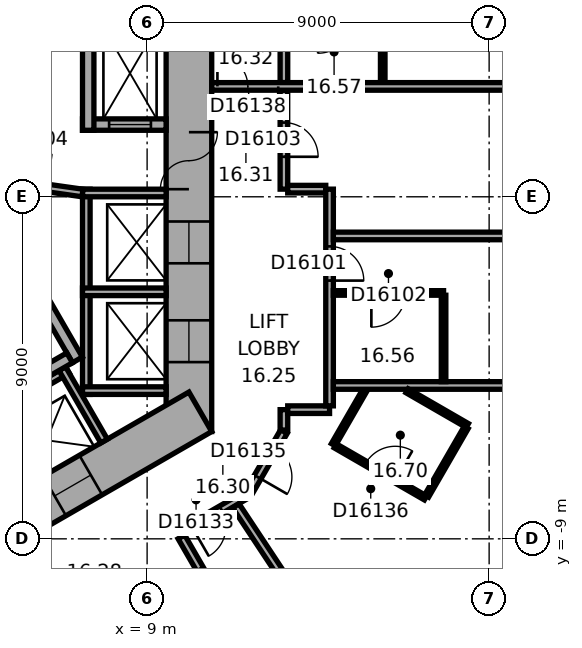
"""IFC4 building model, lengths in metres.
Left out: names, types, materials, properties, quantities, classifications, styles, units other than length and angle.
Written with IfcOpenShell. Run it as: python <this file> out.ifc"""

import sys

from ifc_helpers import new_model, si_unit, direction, frame, frame_2d, origin, place, context, subcontext, project, spatial, rectangle, extrude, element, fill, save


model = new_model("IFC4")
c1 = context("Model", 3, precision=1e-05, world=origin(), true_north=direction((0.0, 1.0)))
c2 = subcontext(c1, "Body", "Model", "MODEL_VIEW")
j1 = project(units=[si_unit("LENGTHUNIT", "METRE"), si_unit("PLANEANGLEUNIT", "RADIAN")], contexts=[c1])
p1 = place(None, origin())
s1 = spatial("IfcSite", under=j1, at=p1, CompositionType="ELEMENT")
p2 = place(p1, origin())
s2 = spatial("IfcBuilding", under=s1, at=p2, CompositionType="ELEMENT")
p3 = place(p2, frame((0.0, 0.0, 73.7)))
s3 = spatial("IfcBuildingStorey", under=s2, at=p3, CompositionType="ELEMENT", Elevation=73.7)
p4 = place(p3, frame((10.1, -6.177, 0.0), z_axis=(0.0, 0.0, 1.0), x_axis=(0.0, 1.0, 0.0)))
e1 = element("IfcWall", 1, at=p4, inside=s3, PredefinedType="SHEAR", context=c2, shape_type="SweptSolid", body=[
    extrude(rectangle(XDim=12.355, YDim=1.2, at=frame_2d((6.177, 0.0))), origin(), (0.0, 0.0, 1.0), 3.3),
])
p5 = place(p4, frame((6.378, 0.0, 0.0)))
e2 = element("IfcOpeningElement", 2, at=p5, cuts=e1, PredefinedType="OPENING", context=c2, shape_type="SweptSolid", body=[
    extrude(rectangle(XDim=1.5, YDim=2.1, at=frame_2d((0.75, 1.05))), frame((0.0, 0.61, 0.0), z_axis=(0.0, -1.0, 0.0), x_axis=(1.0, 0.0, 0.0)), (0.0, 0.0, 1.0), 1.22),
])
p6 = place(p4, frame((1.828, 0.0, 0.0)))
e3 = element("IfcOpeningElement", 3, at=p6, cuts=e1, PredefinedType="OPENING", context=c2, shape_type="SweptSolid", body=[
    extrude(rectangle(XDim=1.1, YDim=2.1, at=frame_2d((0.55, 1.05))), frame((0.0, 0.61, 0.0), z_axis=(0.0, -1.0, 0.0), x_axis=(1.0, 0.0, 0.0)), (0.0, 0.0, 1.0), 1.22),
])
p7 = place(p4, frame((4.427, 0.0, 0.0)))
e4 = element("IfcOpeningElement", 4, at=p7, cuts=e1, PredefinedType="OPENING", context=c2, shape_type="SweptSolid", body=[
    extrude(rectangle(XDim=1.1, YDim=2.1, at=frame_2d((0.55, 1.05))), frame((0.0, 0.61, 0.0), z_axis=(0.0, -1.0, 0.0), x_axis=(1.0, 0.0, 0.0)), (0.0, 0.0, 1.0), 1.22),
])
p8 = place(p3, frame((-0.3, -11.836, 0.0), z_axis=(0.0, 0.0, 1.0), x_axis=(0.866021384402, 0.500006961711, 0.0)))
e5 = element("IfcWall", 5, at=p8, inside=s3, PredefinedType="SHEAR", context=c2, shape_type="SweptSolid", body=[
    extrude(rectangle(XDim=12.355, YDim=1.2, at=frame_2d((6.178, 0.0))), origin(), (0.0, 0.0, 1.0), 3.3),
])
p9 = place(p8, frame((2.828, 0.0, 0.0)))
e6 = element("IfcOpeningElement", 6, at=p9, cuts=e5, PredefinedType="OPENING", context=c2, shape_type="SweptSolid", body=[
    extrude(rectangle(XDim=0.9, YDim=2.1, at=frame_2d((0.45, 1.05))), frame((0.0, 0.61, 0.0), z_axis=(0.0, -1.0, 0.0), x_axis=(1.0, 0.0, 0.0)), (0.0, 0.0, 1.0), 1.22),
])
p10 = place(p8, frame((5.428, 0.0, 0.0)))
e7 = element("IfcOpeningElement", 7, at=p10, cuts=e5, PredefinedType="OPENING", context=c2, shape_type="SweptSolid", body=[
    extrude(rectangle(XDim=0.9, YDim=2.1, at=frame_2d((0.45, 1.05))), frame((0.0, 0.61, 0.0), z_axis=(0.0, -1.0, 0.0), x_axis=(1.0, 0.0, 0.0)), (0.0, 0.0, 1.0), 1.22),
])
p11 = place(p8, frame((7.928, 0.0, 0.0)))
e8 = element("IfcOpeningElement", 8, at=p11, cuts=e5, PredefinedType="OPENING", context=c2, shape_type="SweptSolid", body=[
    extrude(rectangle(XDim=1.1, YDim=2.1, at=frame_2d((0.55, 1.05))), frame((0.0, 0.61, 0.0), z_axis=(0.0, -1.0, 0.0), x_axis=(1.0, 0.0, 0.0)), (0.0, 0.0, 1.0), 1.22),
])
p12 = place(p3, frame((7.4, -5.2, 0.0), z_axis=(0.0, 0.0, 1.0), x_axis=(0.0, 1.0, 0.0)))
e9 = element("IfcWall", 9, at=p12, inside=s3, PredefinedType="PARTITIONING", context=c2, shape_type="SweptSolid", body=[
    extrude(rectangle(XDim=5.4, YDim=0.2, at=frame_2d((2.7, 0.0))), origin(), (0.0, 0.0, 1.0), 2.95),
])
for number, where, z_axis, x_axis in (
    (10, (7.3, -5.1, 0.0), (0.0, 0.0, 1.0), (1.0, 0.0, 0.0)),
    (11, (7.3, -2.5, 0.0), (0.0, 0.0, 1.0), (1.0, 0.0, 0.0)),
    (12, (7.3, 0.1, 0.0), (0.0, 0.0, 1.0), (1.0, 0.0, 0.0)),
):
    element("IfcWall", number, at=place(p3, frame(where, z_axis=z_axis, x_axis=x_axis)), inside=s3, PredefinedType="PARTITIONING", context=c2, shape_type="SweptSolid", body=[
        extrude(rectangle(XDim=2.2, YDim=0.2, at=frame_2d((1.1, 0.0))), origin(), (0.0, 0.0, 1.0), 2.95),
    ])
p13 = place(p3, frame((-0.024, -8.559, 0.0), z_axis=(0.0, 0.0, 1.0), x_axis=(0.866026010844, 0.49999894854, 0.0)))
e13 = element("IfcWall", 13, at=p13, inside=s3, PredefinedType="PARTITIONING", context=c2, shape_type="SweptSolid", body=[
    extrude(rectangle(XDim=8.0, YDim=0.2, at=frame_2d((4.0, 0.0))), origin(), (0.0, 0.0, 1.0), 2.95),
])
p14 = place(p3, frame((6.768, -4.522, 0.0), z_axis=(0.0, 0.0, 1.0), x_axis=(0.50002983664, -0.866008176907, 0.0)))
e14 = element("IfcWall", 14, at=p14, inside=s3, PredefinedType="PARTITIONING", context=c2, shape_type="SweptSolid", body=[
    extrude(rectangle(XDim=2.2, YDim=0.2, at=frame_2d((1.1, 0.0))), origin(), (0.0, 0.0, 1.0), 2.95),
])
p15 = place(p3, frame((4.158, 0.602, 0.0), z_axis=(0.0, 0.0, 1.0), x_axis=(0.499977259774, 0.866038532462, 0.0)))
e15 = element("IfcWall", 15, at=p15, inside=s3, PredefinedType="SHEAR", context=c2, shape_type="SweptSolid", body=[
    extrude(rectangle(XDim=4.7, YDim=0.3, at=frame_2d((2.35, 0.0))), origin(), (0.0, 0.0, 1.0), 2.95),
])
p16 = place(p15, frame((0.8, 0.0, 0.0)))
e16 = element("IfcOpeningElement", 16, at=p16, cuts=e15, PredefinedType="OPENING", context=c2, shape_type="SweptSolid", body=[
    extrude(rectangle(XDim=1.2, YDim=2.1, at=frame_2d((0.6, 1.05))), frame((0.0, 0.16, 0.0), z_axis=(0.0, -1.0, 0.0), x_axis=(1.0, 0.0, 0.0)), (0.0, 0.0, 1.0), 0.32),
])
p17 = place(p3, frame((4.816, -0.222, 0.0), z_axis=(0.0, 0.0, 1.0), x_axis=(0.499977259774, -0.866038532462, 0.0)))
e17 = element("IfcWall", 17, at=p17, inside=s3, PredefinedType="SHEAR", context=c2, shape_type="SweptSolid", body=[
    extrude(rectangle(XDim=4.7, YDim=0.3, at=frame_2d((2.35, 0.0))), origin(), (0.0, 0.0, 1.0), 2.95),
])
p18 = place(p3, frame((0.847, -7.767, 0.0), z_axis=(0.0, 0.0, 1.0), x_axis=(0.866027801685, 0.499995846692, 0.0)))
e18 = element("IfcWall", 18, at=p18, inside=s3, PredefinedType="SHEAR", context=c2, shape_type="SweptSolid", body=[
    extrude(rectangle(XDim=7.06, YDim=0.3, at=frame_2d((3.53, 0.0))), origin(), (0.0, 0.0, 1.0), 2.95),
])
p19 = place(p3, frame((7.3, 1.9, 0.0), z_axis=(0.0, 0.0, 1.0), x_axis=(1.0, 0.0, 0.0)))
e19 = element("IfcWall", 19, at=p19, inside=s3, PredefinedType="SHEAR", context=c2, shape_type="SweptSolid", body=[
    extrude(rectangle(XDim=2.2, YDim=0.3, at=frame_2d((1.1, 0.0))), origin(), (0.0, 0.0, 1.0), 2.95),
])
p20 = place(p19, frame((0.7, 0.0, 0.0)))
e20 = element("IfcOpeningElement", 20, at=p20, cuts=e19, PredefinedType="OPENING", context=c2, shape_type="SweptSolid", body=[
    extrude(rectangle(XDim=1.1, YDim=2.1, at=frame_2d((0.55, 1.05))), frame((0.0, 0.16, 0.0), z_axis=(0.0, -1.0, 0.0), x_axis=(1.0, 0.0, 0.0)), (0.0, 0.0, 1.0), 0.32),
])
p21 = place(p3, frame((7.45, 1.75, 0.0), z_axis=(0.0, 0.0, 1.0), x_axis=(0.0, 1.0, 0.0)))
e21 = element("IfcWall", 21, at=p21, inside=s3, PredefinedType="SHEAR", context=c2, shape_type="SweptSolid", body=[
    extrude(rectangle(XDim=3.35, YDim=0.3, at=frame_2d((1.675, 0.0))), origin(), (0.0, 0.0, 1.0), 2.95),
])
p22 = place(p3, frame((4.327, 0.521, 0.0), z_axis=(0.0, 0.0, 1.0), x_axis=(0.990124376366, -0.14019172346, 0.0)))
e22 = element("IfcWall", 22, at=p22, inside=s3, PredefinedType="PARTITIONING", context=c2, shape_type="SweptSolid", body=[
    extrude(rectangle(XDim=3.002, YDim=0.2, at=frame_2d((1.501, 0.0))), origin(), (0.0, 0.0, 1.0), 2.95),
])
p23 = place(p22, frame((1.15, 0.0, 0.0)))
e23 = element("IfcOpeningElement", 23, at=p23, cuts=e22, PredefinedType="OPENING", context=c2, shape_type="SweptSolid", body=[
    extrude(rectangle(XDim=0.9, YDim=2.1, at=frame_2d((0.45, 1.05))), frame((0.0, 0.11, 0.0), z_axis=(0.0, -1.0, 0.0), x_axis=(1.0, 0.0, 0.0)), (0.0, 0.0, 1.0), 0.22),
])
p24 = place(p3, frame((9.852, -8.861, 0.0), z_axis=(0.0, 0.0, 1.0), x_axis=(0.866013291437, 0.500020978615, 0.0)))
e24 = element("IfcWall", 24, at=p24, inside=s3, PredefinedType="PARTITIONING", context=c2, shape_type="SweptSolid", body=[
    extrude(rectangle(XDim=2.077, YDim=0.2, at=frame_2d((1.038, 0.0))), origin(), (0.0, 0.0, 1.0), 2.95),
])
p25 = place(p24, frame((0.372, 0.0, 0.0)))
e25 = element("IfcOpeningElement", 25, at=p25, cuts=e24, PredefinedType="OPENING", context=c2, shape_type="SweptSolid", body=[
    extrude(rectangle(XDim=0.9, YDim=2.1, at=frame_2d((0.45, 1.05))), frame((0.0, 0.11, 0.0), z_axis=(0.0, -1.0, 0.0), x_axis=(1.0, 0.0, 0.0)), (0.0, 0.0, 1.0), 0.22),
])
p26 = place(p3, frame((10.402, -9.815, 0.0), z_axis=(0.0, 0.0, 1.0), x_axis=(-0.499968756647, 0.866043441391, 0.0)))
e26 = element("IfcWall", 26, at=p26, inside=s3, PredefinedType="PARTITIONING", context=c2, shape_type="SweptSolid", body=[
    extrude(rectangle(XDim=1.001, YDim=0.2, at=frame_2d((0.5, 0.0))), origin(), (0.0, 0.0, 1.0), 2.95),
])
p27 = place(p3, frame((11.67, -7.788, 0.0), z_axis=(0.0, 0.0, 1.0), x_axis=(0.500063286585, 0.865988862174, 0.0)))
e27 = element("IfcWall", 27, at=p27, inside=s3, PredefinedType="PARTITIONING", context=c2, shape_type="SweptSolid", body=[
    extrude(rectangle(XDim=1.86, YDim=0.2, at=frame_2d((0.93, 0.0))), origin(), (0.0, 0.0, 1.0), 2.95),
])
p28 = place(p27, frame((0.48, 0.0, 0.0)))
e28 = element("IfcOpeningElement", 28, at=p28, cuts=e27, PredefinedType="OPENING", context=c2, shape_type="SweptSolid", body=[
    extrude(rectangle(XDim=0.9, YDim=2.1, at=frame_2d((0.45, 1.05))), frame((0.0, 0.11, 0.0), z_axis=(0.0, -1.0, 0.0), x_axis=(1.0, 0.0, 0.0)), (0.0, 0.0, 1.0), 0.22),
])
p29 = place(p3, frame((12.6, -6.138, 0.0), z_axis=(0.0, 0.0, 1.0), x_axis=(0.0, 1.0, 0.0)))
e29 = element("IfcWall", 29, at=p29, inside=s3, PredefinedType="PARTITIONING", context=c2, shape_type="SweptSolid", body=[
    extrude(rectangle(XDim=0.537, YDim=0.2, at=frame_2d((0.268, 0.0))), origin(), (0.0, 0.0, 1.0), 2.95),
])
p30 = place(p3, frame((12.6, 0.201, 0.0), z_axis=(0.0, 0.0, 1.0), x_axis=(0.0, 1.0, 0.0)))
e30 = element("IfcWall", 30, at=p30, inside=s3, PredefinedType="PARTITIONING", context=c2, shape_type="SweptSolid", body=[
    extrude(rectangle(XDim=2.604, YDim=0.2, at=frame_2d((1.302, 0.0))), origin(), (0.0, 0.0, 1.0), 2.95),
])
p31 = place(p30, frame((0.852, 0.0, 0.0)))
e31 = element("IfcOpeningElement", 31, at=p31, cuts=e30, PredefinedType="OPENING", context=c2, shape_type="SweptSolid", body=[
    extrude(rectangle(XDim=0.9, YDim=2.1, at=frame_2d((0.45, 1.05))), frame((0.0, 0.11, 0.0), z_axis=(0.0, -1.0, 0.0), x_axis=(1.0, 0.0, 0.0)), (0.0, 0.0, 1.0), 0.22),
])
p32 = place(p3, frame((12.6, 3.004, 0.0), z_axis=(0.0, 0.0, 1.0), x_axis=(0.0, 1.0, 0.0)))
e32 = element("IfcWall", 32, at=p32, inside=s3, PredefinedType="PARTITIONING", context=c2, shape_type="SweptSolid", body=[
    extrude(rectangle(XDim=3.173, YDim=0.2, at=frame_2d((1.586, 0.0))), origin(), (0.0, 0.0, 1.0), 2.95),
])
p33 = place(p32, frame((1.998, 0.0, 0.0)))
e33 = element("IfcOpeningElement", 33, at=p33, cuts=e32, PredefinedType="OPENING", context=c2, shape_type="SweptSolid", body=[
    extrude(rectangle(XDim=0.9, YDim=2.1, at=frame_2d((0.45, 1.05))), frame((0.0, 0.11, 0.0), z_axis=(0.0, -1.0, 0.0), x_axis=(1.0, 0.0, 0.0)), (0.0, 0.0, 1.0), 0.22),
])
p34 = place(p3, frame((12.7, -5.601, 0.0), z_axis=(0.0, 0.0, 1.0), x_axis=(1.0, 0.0, 0.0)))
e34 = element("IfcWall", 34, at=p34, inside=s3, PredefinedType="PARTITIONING", context=c2, shape_type="SweptSolid", body=[
    extrude(rectangle(XDim=1.101, YDim=0.2, at=frame_2d((0.551, 0.0))), origin(), (0.0, 0.0, 1.0), 2.95),
])
p35 = place(p3, frame((13.701, 0.201, 0.0), z_axis=(0.0, 0.0, 1.0), x_axis=(-1.0, 0.0, 0.0)))
e35 = element("IfcWall", 35, at=p35, inside=s3, PredefinedType="PARTITIONING", context=c2, shape_type="SweptSolid", body=[
    extrude(rectangle(XDim=1.001, YDim=0.2, at=frame_2d((0.5, 0.0))), origin(), (0.0, 0.0, 1.0), 2.95),
])
p36 = place(p3, frame((13.801, -5.501, 0.0), z_axis=(0.0, 0.0, 1.0), x_axis=(0.0, 1.0, 0.0)))
e36 = element("IfcWall", 36, at=p36, inside=s3, PredefinedType="PARTITIONING", context=c2, shape_type="SweptSolid", body=[
    extrude(rectangle(XDim=5.702, YDim=0.2, at=frame_2d((2.851, 0.0))), origin(), (0.0, 0.0, 1.0), 2.95),
])
p37 = place(p36, frame((3.296, 0.0, 0.0)))
e37 = element("IfcOpeningElement", 37, at=p37, cuts=e36, PredefinedType="OPENING", context=c2, shape_type="SweptSolid", body=[
    extrude(rectangle(XDim=0.9, YDim=2.1, at=frame_2d((0.45, 1.05))), frame((0.0, 0.11, 0.0), z_axis=(0.0, -1.0, 0.0), x_axis=(1.0, 0.0, 0.0)), (0.0, 0.0, 1.0), 0.22),
])
p38 = place(p3, frame((13.901, -6.524, 0.0), z_axis=(0.0, 0.0, 1.0), x_axis=(0.499964162598, 0.86604609353, 0.0)))
e38 = element("IfcWall", 38, at=p38, inside=s3, PredefinedType="PARTITIONING", context=c2, shape_type="SweptSolid", body=[
    extrude(rectangle(XDim=1.661, YDim=0.12, at=frame_2d((0.831, 0.0))), origin(), (0.0, 0.0, 1.0), 2.95),
])
p39 = place(p3, frame((13.901, -4.965, 0.0), z_axis=(0.0, 0.0, 1.0), x_axis=(1.0, 0.0, 0.0)))
e39 = element("IfcWall", 39, at=p39, inside=s3, PredefinedType="PARTITIONING", context=c2, shape_type="SweptSolid", body=[
    extrude(rectangle(XDim=8.049, YDim=0.2, at=frame_2d((4.024, 0.0))), origin(), (0.0, 0.0, 1.0), 2.95),
])
p40 = place(p3, frame((13.901, -2.53, 0.0), z_axis=(0.0, 0.0, 1.0), x_axis=(1.0, 0.0, 0.0)))
e40 = element("IfcWall", 40, at=p40, inside=s3, PredefinedType="PARTITIONING", context=c2, shape_type="SweptSolid", body=[
    extrude(rectangle(XDim=2.9, YDim=0.12, at=frame_2d((1.45, 0.0))), origin(), (0.0, 0.0, 1.0), 2.95),
])
p41 = place(p40, frame((1.0, 0.0, 0.0)))
e41 = element("IfcOpeningElement", 41, at=p41, cuts=e40, PredefinedType="OPENING", context=c2, shape_type="SweptSolid", body=[
    extrude(rectangle(XDim=0.9, YDim=2.1, at=frame_2d((0.45, 1.05))), frame((0.0, 0.07, 0.0), z_axis=(0.0, -1.0, 0.0), x_axis=(1.0, 0.0, 0.0)), (0.0, 0.0, 1.0), 0.14),
])
p42 = place(p3, frame((15.2, 4.618, 0.0), z_axis=(0.0, 0.0, 1.0), x_axis=(0.0, -1.0, 0.0)))
e42 = element("IfcWall", 42, at=p42, inside=s3, PredefinedType="PARTITIONING", context=c2, shape_type="SweptSolid", body=[
    extrude(rectangle(XDim=1.613, YDim=0.12, at=frame_2d((0.807, 0.0))), origin(), (0.0, 0.0, 1.0), 2.95),
])
p43 = place(p3, frame((15.841, -5.104, 0.0), z_axis=(0.0, 0.0, 1.0), x_axis=(0.866025591402, -0.499999675036, 0.0)))
e43 = element("IfcWall", 43, at=p43, inside=s3, PredefinedType="PARTITIONING", context=c2, shape_type="SweptSolid", body=[
    extrude(rectangle(XDim=1.83, YDim=0.12, at=frame_2d((0.915, 0.0))), origin(), (0.0, 0.0, 1.0), 2.95),
])
p44 = place(p3, frame((16.255, -15.564, 0.0), z_axis=(0.0, 0.0, 1.0), x_axis=(-0.55192208744, 0.833895682562, 0.0)))
e44 = element("IfcWall", 44, at=p44, inside=s3, PredefinedType="PARTITIONING", context=c2, shape_type="SweptSolid", body=[
    extrude(rectangle(XDim=8.913, YDim=0.2, at=frame_2d((4.457, 0.0))), origin(), (0.0, 0.0, 1.0), 2.15),
])
p45 = place(p3, frame((16.326, -7.925, 0.0), z_axis=(0.0, 0.0, 1.0), x_axis=(-0.865997131366, 0.500048966069, 0.0)))
e45 = element("IfcWall", 45, at=p45, inside=s3, PredefinedType="PARTITIONING", context=c2, shape_type="SweptSolid", body=[
    extrude(rectangle(XDim=2.74, YDim=0.12, at=frame_2d((1.37, 0.0))), origin(), (0.0, 0.0, 1.0), 2.95),
])
p46 = place(p45, frame((0.92, 0.0, 0.0)))
e46 = element("IfcOpeningElement", 46, at=p46, cuts=e45, PredefinedType="OPENING", context=c2, shape_type="SweptSolid", body=[
    extrude(rectangle(XDim=0.9, YDim=2.1, at=frame_2d((0.45, 1.05))), frame((0.0, 0.07, 0.0), z_axis=(0.0, -1.0, 0.0), x_axis=(1.0, 0.0, 0.0)), (0.0, 0.0, 1.0), 0.14),
])
p47 = place(p3, frame((16.801, -2.59, 0.0), z_axis=(0.0, 0.0, 1.0), x_axis=(0.0, -1.0, 0.0)))
e47 = element("IfcWall", 47, at=p47, inside=s3, PredefinedType="PARTITIONING", context=c2, shape_type="SweptSolid", body=[
    extrude(rectangle(XDim=2.274, YDim=0.12, at=frame_2d((1.137, 0.0))), origin(), (0.0, 0.0, 1.0), 2.95),
])
p48 = place(p3, frame((17.396, -6.071, 0.0), z_axis=(0.0, 0.0, 1.0), x_axis=(-0.500027264788, -0.866009661879, 0.0)))
e48 = element("IfcWall", 48, at=p48, inside=s3, PredefinedType="PARTITIONING", context=c2, shape_type="SweptSolid", body=[
    extrude(rectangle(XDim=2.08, YDim=0.12, at=frame_2d((1.04, 0.0))), origin(), (0.0, 0.0, 1.0), 2.95),
])
p49 = place(p3, frame((21.95, -1.03, 0.0), z_axis=(0.0, 0.0, 1.0), x_axis=(-1.0, 0.0, 0.0)))
e49 = element("IfcWall", 49, at=p49, inside=s3, PredefinedType="PARTITIONING", context=c2, shape_type="SweptSolid", body=[
    extrude(rectangle(XDim=8.049, YDim=0.2, at=frame_2d((4.024, 0.0))), origin(), (0.0, 0.0, 1.0), 2.15),
])
p50 = place(p3, frame((21.95, 2.905, 0.0), z_axis=(0.0, 0.0, 1.0), x_axis=(-1.0, 0.0, 0.0)))
e50 = element("IfcWall", 50, at=p50, inside=s3, PredefinedType="PARTITIONING", context=c2, shape_type="SweptSolid", body=[
    extrude(rectangle(XDim=11.25, YDim=0.2, at=frame_2d((5.625, 0.0))), origin(), (0.0, 0.0, 1.0), 2.95),
])
p51 = place(p50, frame((9.5, 0.0, 0.0)))
e51 = element("IfcOpeningElement", 51, at=p51, cuts=e50, PredefinedType="OPENING", context=c2, shape_type="SweptSolid", body=[
    extrude(rectangle(XDim=1.6, YDim=2.1, at=frame_2d((0.8, 1.05))), frame((0.0, 0.11, 0.0), z_axis=(0.0, -1.0, 0.0), x_axis=(1.0, 0.0, 0.0)), (0.0, 0.0, 1.0), 0.22),
])
p52 = place(p5, origin())
e52 = element("IfcDoor", 52, at=p52, inside=s3, OperationType="DOUBLE_DOOR_SINGLE_SWING", PredefinedType="DOOR", context=c2, shape_type="SweptSolid", body=[
    extrude(rectangle(XDim=1.5, YDim=2.1, at=frame_2d((0.75, 1.05))), frame((0.0, 0.025, 0.0), z_axis=(0.0, -1.0, 0.0), x_axis=(1.0, 0.0, 0.0)), (0.0, 0.0, 1.0), 0.05),
])
fill(e2, e52)
p53 = place(p20, origin())
e53 = element("IfcDoor", 53, at=p53, inside=s3, OperationType="DOUBLE_DOOR_SLIDING", PredefinedType="DOOR", context=c2, shape_type="SweptSolid", body=[
    extrude(rectangle(XDim=1.1, YDim=2.1, at=frame_2d((0.55, 1.05))), frame((0.0, 0.025, 0.0), z_axis=(0.0, -1.0, 0.0), x_axis=(1.0, 0.0, 0.0)), (0.0, 0.0, 1.0), 0.05),
])
fill(e20, e53)
p54 = place(p6, origin())
e54 = element("IfcDoor", 54, at=p54, inside=s3, OperationType="DOUBLE_DOOR_SLIDING", PredefinedType="DOOR", context=c2, shape_type="SweptSolid", body=[
    extrude(rectangle(XDim=1.1, YDim=2.1, at=frame_2d((0.55, 1.05))), frame((0.0, 0.025, 0.0), z_axis=(0.0, -1.0, 0.0), x_axis=(1.0, 0.0, 0.0)), (0.0, 0.0, 1.0), 0.05),
])
fill(e3, e54)
p55 = place(p7, origin())
e55 = element("IfcDoor", 55, at=p55, inside=s3, OperationType="DOUBLE_DOOR_SLIDING", PredefinedType="DOOR", context=c2, shape_type="SweptSolid", body=[
    extrude(rectangle(XDim=1.1, YDim=2.1, at=frame_2d((0.55, 1.05))), frame((0.0, 0.025, 0.0), z_axis=(0.0, -1.0, 0.0), x_axis=(1.0, 0.0, 0.0)), (0.0, 0.0, 1.0), 0.05),
])
fill(e4, e55)
p56 = place(p11, origin())
e56 = element("IfcDoor", 56, at=p56, inside=s3, OperationType="DOUBLE_DOOR_SLIDING", PredefinedType="DOOR", context=c2, shape_type="SweptSolid", body=[
    extrude(rectangle(XDim=1.1, YDim=2.1, at=frame_2d((0.55, 1.05))), frame((0.0, 0.025, 0.0), z_axis=(0.0, -1.0, 0.0), x_axis=(1.0, 0.0, 0.0)), (0.0, 0.0, 1.0), 0.05),
])
fill(e8, e56)
p57 = place(p37, origin())
e57 = element("IfcDoor", 57, at=p57, inside=s3, OperationType="SINGLE_SWING_LEFT", PredefinedType="DOOR", context=c2, shape_type="SweptSolid", body=[
    extrude(rectangle(XDim=0.9, YDim=2.1, at=frame_2d((0.45, 1.05))), frame((0.0, 0.025, 0.0), z_axis=(0.0, -1.0, 0.0), x_axis=(1.0, 0.0, 0.0)), (0.0, 0.0, 1.0), 0.05),
])
fill(e37, e57)
p58 = place(p41, origin())
e58 = element("IfcDoor", 58, at=p58, inside=s3, OperationType="SINGLE_SWING_LEFT", PredefinedType="DOOR", context=c2, shape_type="SweptSolid", body=[
    extrude(rectangle(XDim=0.9, YDim=2.1, at=frame_2d((0.45, 1.05))), frame((0.0, 0.025, 0.0), z_axis=(0.0, -1.0, 0.0), x_axis=(1.0, 0.0, 0.0)), (0.0, 0.0, 1.0), 0.05),
])
fill(e41, e58)
p59 = place(p31, origin())
e59 = element("IfcDoor", 59, at=p59, inside=s3, OperationType="SINGLE_SWING_LEFT", PredefinedType="DOOR", context=c2, shape_type="SweptSolid", body=[
    extrude(rectangle(XDim=0.9, YDim=2.1, at=frame_2d((0.45, 1.05))), frame((0.0, 0.025, 0.0), z_axis=(0.0, -1.0, 0.0), x_axis=(1.0, 0.0, 0.0)), (0.0, 0.0, 1.0), 0.05),
])
fill(e31, e59)
p60 = place(p25, origin())
e60 = element("IfcDoor", 60, at=p60, inside=s3, OperationType="SINGLE_SWING_LEFT", PredefinedType="DOOR", context=c2, shape_type="SweptSolid", body=[
    extrude(rectangle(XDim=0.9, YDim=2.1, at=frame_2d((0.45, 1.05))), frame((0.0, 0.025, 0.0), z_axis=(0.0, -1.0, 0.0), x_axis=(1.0, 0.0, 0.0)), (0.0, 0.0, 1.0), 0.05),
])
fill(e25, e60)
p61 = place(p28, origin())
e61 = element("IfcDoor", 61, at=p61, inside=s3, OperationType="SINGLE_SWING_LEFT", PredefinedType="DOOR", context=c2, shape_type="SweptSolid", body=[
    extrude(rectangle(XDim=0.9, YDim=2.1, at=frame_2d((0.45, 1.05))), frame((0.0, 0.025, 0.0), z_axis=(0.0, -1.0, 0.0), x_axis=(1.0, 0.0, 0.0)), (0.0, 0.0, 1.0), 0.05),
])
fill(e28, e61)
p62 = place(p46, origin())
e62 = element("IfcDoor", 62, at=p62, inside=s3, OperationType="SINGLE_SWING_LEFT", PredefinedType="DOOR", context=c2, shape_type="SweptSolid", body=[
    extrude(rectangle(XDim=0.9, YDim=2.1, at=frame_2d((0.45, 1.05))), frame((0.0, 0.025, 0.0), z_axis=(0.0, -1.0, 0.0), x_axis=(1.0, 0.0, 0.0)), (0.0, 0.0, 1.0), 0.05),
])
fill(e46, e62)
p63 = place(p51, origin())
e63 = element("IfcDoor", 63, at=p63, inside=s3, OperationType="DOUBLE_DOOR_SINGLE_SWING", PredefinedType="DOOR", context=c2, shape_type="SweptSolid", body=[
    extrude(rectangle(XDim=1.6, YDim=2.1, at=frame_2d((0.8, 1.05))), frame((0.0, 0.025, 0.0), z_axis=(0.0, -1.0, 0.0), x_axis=(1.0, 0.0, 0.0)), (0.0, 0.0, 1.0), 0.05),
])
fill(e51, e63)
save(model, sys.argv[1])
